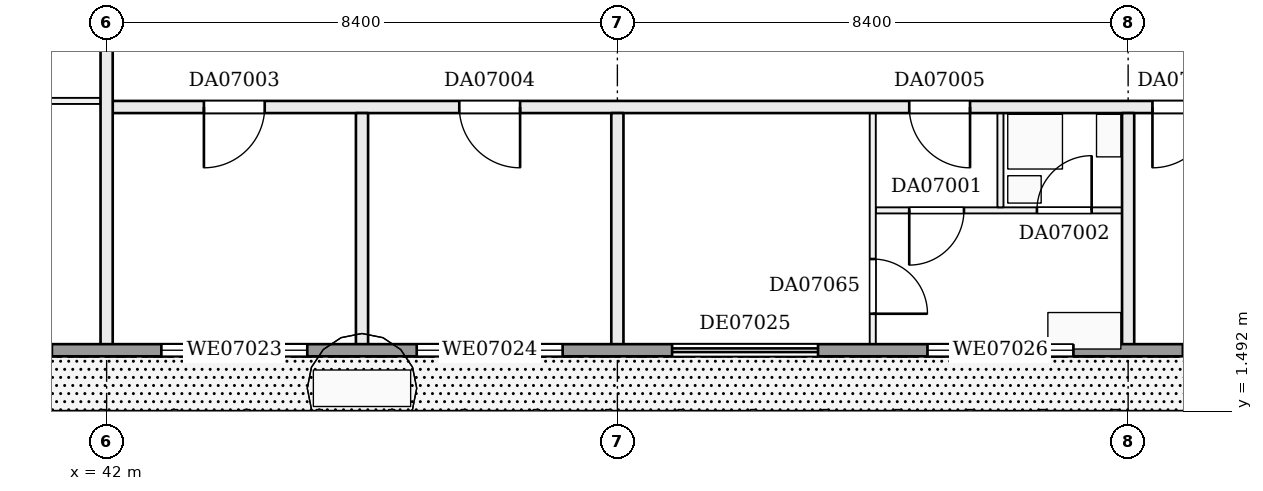
"""IFC4 building model, lengths in metres.
Left out: names, types, materials, properties, quantities, classifications, styles, units other than length and angle.
Written with IfcOpenShell. Run it as: python <this file> out.ifc"""

import sys

from ifc_helpers import new_model, si_unit, direction, frame, frame_2d, origin, place, context, subcontext, project, spatial, rectangle, extrude, element, fill, save


model = new_model("IFC4")
c1 = context("Model", 3, precision=1e-05, world=origin(), true_north=direction((0.0, 1.0)))
c2 = subcontext(c1, "Body", "Model", "MODEL_VIEW")
j1 = project(units=[si_unit("LENGTHUNIT", "METRE"), si_unit("PLANEANGLEUNIT", "RADIAN")], contexts=[c1])
p1 = place(None, origin())
s1 = spatial("IfcSite", under=j1, at=p1, CompositionType="ELEMENT")
p2 = place(p1, origin())
s2 = spatial("IfcBuilding", under=s1, at=p2, CompositionType="ELEMENT")
p3 = place(p2, frame((0.0, 0.0, 35.7)))
s3 = spatial("IfcBuildingStorey", under=s2, at=p3, CompositionType="ELEMENT", Elevation=35.7)
p4 = place(p3, frame((54.65, 4.8, 0.0), z_axis=(0.0, 0.0, 1.0), x_axis=(1.0, 0.0, 0.0)))
e1 = element("IfcWall", 1, at=p4, inside=s3, PredefinedType="PARTITIONING", context=c2, shape_type="SweptSolid", body=[
    extrude(rectangle(XDim=4.05, YDim=0.1, at=frame_2d((2.025, 0.0))), origin(), (0.0, 0.0, 1.0), 3.22),
])
p5 = place(p4, frame((0.55, 0.0, 0.0)))
e2 = element("IfcOpeningElement", 2, at=p5, cuts=e1, PredefinedType="OPENING", context=c2, shape_type="SweptSolid", body=[
    extrude(rectangle(XDim=0.9, YDim=2.1, at=frame_2d((0.45, 1.05))), frame((0.0, 0.06, 0.0), z_axis=(0.0, -1.0, 0.0), x_axis=(1.0, 0.0, 0.0)), (0.0, 0.0, 1.0), 0.12),
])
p6 = place(p4, frame((2.65, 0.0, 0.0)))
e3 = element("IfcOpeningElement", 3, at=p6, cuts=e1, PredefinedType="OPENING", context=c2, shape_type="SweptSolid", body=[
    extrude(rectangle(XDim=0.9, YDim=2.1, at=frame_2d((0.45, 1.05))), frame((0.0, 0.06, 0.0), z_axis=(0.0, -1.0, 0.0), x_axis=(1.0, 0.0, 0.0)), (0.0, 0.0, 1.0), 0.12),
])
p7 = place(p3, frame((42.1, 6.5, 0.0), z_axis=(0.0, 0.0, 1.0), x_axis=(1.0, 0.0, 0.0)))
e4 = element("IfcWall", 4, at=p7, inside=s3, PredefinedType="PARTITIONING", context=c2, shape_type="SweptSolid", body=[
    extrude(rectangle(XDim=18.7, YDim=0.2, at=frame_2d((9.35, 0.0))), origin(), (0.0, 0.0, 1.0), 3.22),
])
p8 = place(p7, frame((1.5, 0.0, 0.0)))
e5 = element("IfcOpeningElement", 5, at=p8, cuts=e4, PredefinedType="OPENING", context=c2, shape_type="SweptSolid", body=[
    extrude(rectangle(XDim=1.0, YDim=2.1, at=frame_2d((0.5, 1.05))), frame((0.0, 0.11, 0.0), z_axis=(0.0, -1.0, 0.0), x_axis=(1.0, 0.0, 0.0)), (0.0, 0.0, 1.0), 0.22),
])
p9 = place(p7, frame((5.7, 0.0, 0.0)))
e6 = element("IfcOpeningElement", 6, at=p9, cuts=e4, PredefinedType="OPENING", context=c2, shape_type="SweptSolid", body=[
    extrude(rectangle(XDim=1.0, YDim=2.1, at=frame_2d((0.5, 1.05))), frame((0.0, 0.11, 0.0), z_axis=(0.0, -1.0, 0.0), x_axis=(1.0, 0.0, 0.0)), (0.0, 0.0, 1.0), 0.22),
])
p10 = place(p7, frame((13.1, 0.0, 0.0)))
e7 = element("IfcOpeningElement", 7, at=p10, cuts=e4, PredefinedType="OPENING", context=c2, shape_type="SweptSolid", body=[
    extrude(rectangle(XDim=1.0, YDim=2.1, at=frame_2d((0.5, 1.05))), frame((0.0, 0.11, 0.0), z_axis=(0.0, -1.0, 0.0), x_axis=(1.0, 0.0, 0.0)), (0.0, 0.0, 1.0), 0.22),
])
p11 = place(p7, frame((17.1, 0.0, 0.0)))
e8 = element("IfcOpeningElement", 8, at=p11, cuts=e4, PredefinedType="OPENING", context=c2, shape_type="SweptSolid", body=[
    extrude(rectangle(XDim=1.0, YDim=2.1, at=frame_2d((0.5, 1.05))), frame((0.0, 0.11, 0.0), z_axis=(0.0, -1.0, 0.0), x_axis=(1.0, 0.0, 0.0)), (0.0, 0.0, 1.0), 0.22),
])
p12 = place(p3, frame((12.65, 6.6, 0.0), z_axis=(0.0, 0.0, 1.0), x_axis=(1.0, 0.0, 0.0)))
e9 = element("IfcWall", 9, at=p12, inside=s3, PredefinedType="PARTITIONING", context=c2, shape_type="SweptSolid", body=[
    extrude(rectangle(XDim=29.25, YDim=0.1, at=frame_2d((14.625, 0.0))), origin(), (0.0, 0.0, 1.0), 3.22),
])
p13 = place(p12, frame((1.65, 0.0, 0.0)))
e10 = element("IfcOpeningElement", 10, at=p13, cuts=e9, PredefinedType="OPENING", context=c2, shape_type="SweptSolid", body=[
    extrude(rectangle(XDim=0.9, YDim=2.1, at=frame_2d((0.45, 1.05))), frame((0.0, 0.06, 0.0), z_axis=(0.0, -1.0, 0.0), x_axis=(1.0, 0.0, 0.0)), (0.0, 0.0, 1.0), 0.12),
])
p14 = place(p12, frame((5.75, 0.0, 0.0)))
e11 = element("IfcOpeningElement", 11, at=p14, cuts=e9, PredefinedType="OPENING", context=c2, shape_type="SweptSolid", body=[
    extrude(rectangle(XDim=0.9, YDim=2.1, at=frame_2d((0.45, 1.05))), frame((0.0, 0.06, 0.0), z_axis=(0.0, -1.0, 0.0), x_axis=(1.0, 0.0, 0.0)), (0.0, 0.0, 1.0), 0.12),
])
p15 = place(p12, frame((11.15, 0.0, 0.0)))
e12 = element("IfcOpeningElement", 12, at=p15, cuts=e9, PredefinedType="OPENING", context=c2, shape_type="SweptSolid", body=[
    extrude(rectangle(XDim=0.9, YDim=2.1, at=frame_2d((0.45, 1.05))), frame((0.0, 0.06, 0.0), z_axis=(0.0, -1.0, 0.0), x_axis=(1.0, 0.0, 0.0)), (0.0, 0.0, 1.0), 0.12),
])
p16 = place(p12, frame((18.35, 0.0, 0.0)))
e13 = element("IfcOpeningElement", 13, at=p16, cuts=e9, PredefinedType="OPENING", context=c2, shape_type="SweptSolid", body=[
    extrude(rectangle(XDim=0.9, YDim=2.1, at=frame_2d((0.45, 1.05))), frame((0.0, 0.06, 0.0), z_axis=(0.0, -1.0, 0.0), x_axis=(1.0, 0.0, 0.0)), (0.0, 0.0, 1.0), 0.12),
])
p17 = place(p12, frame((22.55, 0.0, 0.0)))
e14 = element("IfcOpeningElement", 14, at=p17, cuts=e9, PredefinedType="OPENING", context=c2, shape_type="SweptSolid", body=[
    extrude(rectangle(XDim=0.9, YDim=2.1, at=frame_2d((0.45, 1.05))), frame((0.0, 0.06, 0.0), z_axis=(0.0, -1.0, 0.0), x_axis=(1.0, 0.0, 0.0)), (0.0, 0.0, 1.0), 0.12),
])
p18 = place(p12, frame((26.75, 0.0, 0.0)))
e15 = element("IfcOpeningElement", 15, at=p18, cuts=e9, PredefinedType="OPENING", context=c2, shape_type="SweptSolid", body=[
    extrude(rectangle(XDim=0.9, YDim=2.1, at=frame_2d((0.45, 1.05))), frame((0.0, 0.06, 0.0), z_axis=(0.0, -1.0, 0.0), x_axis=(1.0, 0.0, 0.0)), (0.0, 0.0, 1.0), 0.12),
])
p19 = place(p3, frame((42.0, 2.5, 0.0), z_axis=(0.0, 0.0, 1.0), x_axis=(0.0, 1.0, 0.0)))
e16 = element("IfcWall", 16, at=p19, inside=s3, PredefinedType="PARTITIONING", context=c2, shape_type="SweptSolid", body=[
    extrude(rectangle(XDim=5.9, YDim=0.2, at=frame_2d((2.95, 0.0))), origin(), (0.0, 0.0, 1.0), 3.22),
])
for number, where, z_axis, x_axis in (
    (17, (46.2, 2.5, 0.0), (0.0, 0.0, 1.0), (0.0, 1.0, 0.0)),
    (18, (50.4, 2.5, 0.0), (0.0, 0.0, 1.0), (0.0, 1.0, 0.0)),
):
    element("IfcWall", number, at=place(p3, frame(where, z_axis=z_axis, x_axis=x_axis)), inside=s3, PredefinedType="PARTITIONING", context=c2, shape_type="SweptSolid", body=[
        extrude(rectangle(XDim=3.9, YDim=0.2, at=frame_2d((1.95, 0.0))), origin(), (0.0, 0.0, 1.0), 3.22),
    ])
p20 = place(p3, frame((54.6, 2.5, 0.0), z_axis=(0.0, 0.0, 1.0), x_axis=(0.0, 1.0, 0.0)))
e19 = element("IfcWall", 19, at=p20, inside=s3, PredefinedType="PARTITIONING", context=c2, shape_type="SweptSolid", body=[
    extrude(rectangle(XDim=3.9, YDim=0.1, at=frame_2d((1.95, 0.0))), origin(), (0.0, 0.0, 1.0), 3.22),
])
p21 = place(p20, frame((0.6, 0.0, 0.0)))
e20 = element("IfcOpeningElement", 20, at=p21, cuts=e19, PredefinedType="OPENING", context=c2, shape_type="SweptSolid", body=[
    extrude(rectangle(XDim=0.9, YDim=2.1, at=frame_2d((0.45, 1.05))), frame((0.0, 0.06, 0.0), z_axis=(0.0, -1.0, 0.0), x_axis=(1.0, 0.0, 0.0)), (0.0, 0.0, 1.0), 0.12),
])
p22 = place(p3, frame((56.7, 4.85, 0.0), z_axis=(0.0, 0.0, 1.0), x_axis=(0.0, 1.0, 0.0)))
e21 = element("IfcWall", 21, at=p22, inside=s3, PredefinedType="PARTITIONING", context=c2, shape_type="SweptSolid", body=[
    extrude(rectangle(XDim=1.55, YDim=0.1, at=frame_2d((0.775, 0.0))), origin(), (0.0, 0.0, 1.0), 3.22),
])
p23 = place(p3, frame((58.8, 2.5, 0.0), z_axis=(0.0, 0.0, 1.0), x_axis=(0.0, 1.0, 0.0)))
e22 = element("IfcWall", 22, at=p23, inside=s3, PredefinedType="PARTITIONING", context=c2, shape_type="SweptSolid", body=[
    extrude(rectangle(XDim=3.9, YDim=0.2, at=frame_2d((1.95, 0.0))), origin(), (0.0, 0.0, 1.0), 3.22),
])
p24 = place(p3, frame((4.8, 2.5, 0.0), z_axis=(0.0, 0.0, 1.0), x_axis=(1.0, 0.0, 0.0)))
e23 = element("IfcWall", 23, at=p24, inside=s3, PredefinedType="SOLIDWALL", context=c2, shape_type="SweptSolid", body=[
    extrude(rectangle(XDim=57.6, YDim=0.2, at=frame_2d((28.8, 0.0))), origin(), (0.0, 0.0, 1.0), 3.22),
])
p25 = place(p24, frame((0.3, 0.0, 0.0)))
e24 = element("IfcOpeningElement", 24, at=p25, cuts=e23, PredefinedType="OPENING", context=c2, shape_type="SweptSolid", body=[
    extrude(rectangle(XDim=2.4, YDim=2.2, at=frame_2d((1.2, 1.1))), frame((0.0, 0.11, 0.0), z_axis=(0.0, -1.0, 0.0), x_axis=(1.0, 0.0, 0.0)), (0.0, 0.0, 1.0), 0.22),
])
p26 = place(p24, frame((4.5, 0.0, 0.9)))
e25 = element("IfcOpeningElement", 25, at=p26, cuts=e23, PredefinedType="OPENING", context=c2, shape_type="SweptSolid", body=[
    extrude(rectangle(XDim=2.4, YDim=1.5, at=frame_2d((1.2, 0.75))), frame((0.0, 0.11, 0.0), z_axis=(0.0, -1.0, 0.0), x_axis=(1.0, 0.0, 0.0)), (0.0, 0.0, 1.0), 0.22),
])
p27 = place(p24, frame((8.7, 0.0, 0.9)))
e26 = element("IfcOpeningElement", 26, at=p27, cuts=e23, PredefinedType="OPENING", context=c2, shape_type="SweptSolid", body=[
    extrude(rectangle(XDim=2.4, YDim=1.5, at=frame_2d((1.2, 0.75))), frame((0.0, 0.11, 0.0), z_axis=(0.0, -1.0, 0.0), x_axis=(1.0, 0.0, 0.0)), (0.0, 0.0, 1.0), 0.22),
])
p28 = place(p24, frame((12.9, 0.0, 0.9)))
e27 = element("IfcOpeningElement", 27, at=p28, cuts=e23, PredefinedType="OPENING", context=c2, shape_type="SweptSolid", body=[
    extrude(rectangle(XDim=2.4, YDim=1.5, at=frame_2d((1.2, 0.75))), frame((0.0, 0.11, 0.0), z_axis=(0.0, -1.0, 0.0), x_axis=(1.0, 0.0, 0.0)), (0.0, 0.0, 1.0), 0.22),
])
p29 = place(p24, frame((17.1, 0.0, 0.0)))
e28 = element("IfcOpeningElement", 28, at=p29, cuts=e23, PredefinedType="OPENING", context=c2, shape_type="SweptSolid", body=[
    extrude(rectangle(XDim=2.4, YDim=2.2, at=frame_2d((1.2, 1.1))), frame((0.0, 0.11, 0.0), z_axis=(0.0, -1.0, 0.0), x_axis=(1.0, 0.0, 0.0)), (0.0, 0.0, 1.0), 0.22),
])
p30 = place(p24, frame((21.3, 0.0, 0.0)))
e29 = element("IfcOpeningElement", 29, at=p30, cuts=e23, PredefinedType="OPENING", context=c2, shape_type="SweptSolid", body=[
    extrude(rectangle(XDim=2.4, YDim=2.2, at=frame_2d((1.2, 1.1))), frame((0.0, 0.11, 0.0), z_axis=(0.0, -1.0, 0.0), x_axis=(1.0, 0.0, 0.0)), (0.0, 0.0, 1.0), 0.22),
])
p31 = place(p24, frame((25.5, 0.0, 0.9)))
e30 = element("IfcOpeningElement", 30, at=p31, cuts=e23, PredefinedType="OPENING", context=c2, shape_type="SweptSolid", body=[
    extrude(rectangle(XDim=2.4, YDim=1.5, at=frame_2d((1.2, 0.75))), frame((0.0, 0.11, 0.0), z_axis=(0.0, -1.0, 0.0), x_axis=(1.0, 0.0, 0.0)), (0.0, 0.0, 1.0), 0.22),
])
p32 = place(p24, frame((29.7, 0.0, 0.0)))
e31 = element("IfcOpeningElement", 31, at=p32, cuts=e23, PredefinedType="OPENING", context=c2, shape_type="SweptSolid", body=[
    extrude(rectangle(XDim=2.4, YDim=2.2, at=frame_2d((1.2, 1.1))), frame((0.0, 0.11, 0.0), z_axis=(0.0, -1.0, 0.0), x_axis=(1.0, 0.0, 0.0)), (0.0, 0.0, 1.0), 0.22),
])
p33 = place(p24, frame((33.9, 0.0, 0.9)))
e32 = element("IfcOpeningElement", 32, at=p33, cuts=e23, PredefinedType="OPENING", context=c2, shape_type="SweptSolid", body=[
    extrude(rectangle(XDim=2.4, YDim=1.5, at=frame_2d((1.2, 0.75))), frame((0.0, 0.11, 0.0), z_axis=(0.0, -1.0, 0.0), x_axis=(1.0, 0.0, 0.0)), (0.0, 0.0, 1.0), 0.22),
])
p34 = place(p24, frame((38.1, 0.0, 0.9)))
e33 = element("IfcOpeningElement", 33, at=p34, cuts=e23, PredefinedType="OPENING", context=c2, shape_type="SweptSolid", body=[
    extrude(rectangle(XDim=2.4, YDim=1.5, at=frame_2d((1.2, 0.75))), frame((0.0, 0.11, 0.0), z_axis=(0.0, -1.0, 0.0), x_axis=(1.0, 0.0, 0.0)), (0.0, 0.0, 1.0), 0.22),
])
p35 = place(p24, frame((42.3, 0.0, 0.9)))
e34 = element("IfcOpeningElement", 34, at=p35, cuts=e23, PredefinedType="OPENING", context=c2, shape_type="SweptSolid", body=[
    extrude(rectangle(XDim=2.4, YDim=1.5, at=frame_2d((1.2, 0.75))), frame((0.0, 0.11, 0.0), z_axis=(0.0, -1.0, 0.0), x_axis=(1.0, 0.0, 0.0)), (0.0, 0.0, 1.0), 0.22),
])
p36 = place(p24, frame((46.5, 0.0, 0.0)))
e35 = element("IfcOpeningElement", 35, at=p36, cuts=e23, PredefinedType="OPENING", context=c2, shape_type="SweptSolid", body=[
    extrude(rectangle(XDim=2.4, YDim=2.2, at=frame_2d((1.2, 1.1))), frame((0.0, 0.11, 0.0), z_axis=(0.0, -1.0, 0.0), x_axis=(1.0, 0.0, 0.0)), (0.0, 0.0, 1.0), 0.22),
])
p37 = place(p24, frame((50.7, 0.0, 0.9)))
e36 = element("IfcOpeningElement", 36, at=p37, cuts=e23, PredefinedType="OPENING", context=c2, shape_type="SweptSolid", body=[
    extrude(rectangle(XDim=2.4, YDim=1.5, at=frame_2d((1.2, 0.75))), frame((0.0, 0.11, 0.0), z_axis=(0.0, -1.0, 0.0), x_axis=(1.0, 0.0, 0.0)), (0.0, 0.0, 1.0), 0.22),
])
p38 = place(p24, frame((54.9, 0.0, 0.9)))
e37 = element("IfcOpeningElement", 37, at=p38, cuts=e23, PredefinedType="OPENING", context=c2, shape_type="SweptSolid", body=[
    extrude(rectangle(XDim=2.4, YDim=1.5, at=frame_2d((1.2, 0.75))), frame((0.0, 0.11, 0.0), z_axis=(0.0, -1.0, 0.0), x_axis=(1.0, 0.0, 0.0)), (0.0, 0.0, 1.0), 0.22),
])
p39 = place(p5, frame((0.9, 0.0, 0.0), z_axis=(0.0, 0.0, 1.0), x_axis=(-1.0, 0.0, 0.0)))
e38 = element("IfcDoor", 38, at=p39, inside=s3, OperationType="SINGLE_SWING_RIGHT", PredefinedType="DOOR", context=c2, shape_type="SweptSolid", body=[
    extrude(rectangle(XDim=0.9, YDim=2.1, at=frame_2d((0.45, 1.05))), frame((0.0, 0.025, 0.0), z_axis=(0.0, -1.0, 0.0), x_axis=(1.0, 0.0, 0.0)), (0.0, 0.0, 1.0), 0.05),
])
fill(e2, e38)
p40 = place(p6, origin())
e39 = element("IfcDoor", 39, at=p40, inside=s3, OperationType="SINGLE_SWING_RIGHT", PredefinedType="DOOR", context=c2, shape_type="SweptSolid", body=[
    extrude(rectangle(XDim=0.9, YDim=2.1, at=frame_2d((0.45, 1.05))), frame((0.0, 0.025, 0.0), z_axis=(0.0, -1.0, 0.0), x_axis=(1.0, 0.0, 0.0)), (0.0, 0.0, 1.0), 0.05),
])
fill(e3, e39)
p41 = place(p8, frame((1.0, 0.0, 0.0), z_axis=(0.0, 0.0, 1.0), x_axis=(-1.0, 0.0, 0.0)))
e40 = element("IfcDoor", 40, at=p41, inside=s3, OperationType="SINGLE_SWING_RIGHT", PredefinedType="DOOR", context=c2, shape_type="SweptSolid", body=[
    extrude(rectangle(XDim=1.0, YDim=2.1, at=frame_2d((0.5, 1.05))), frame((0.0, 0.025, 0.0), z_axis=(0.0, -1.0, 0.0), x_axis=(1.0, 0.0, 0.0)), (0.0, 0.0, 1.0), 0.05),
])
fill(e5, e40)
p42 = place(p9, frame((1.0, 0.0, 0.0), z_axis=(0.0, 0.0, 1.0), x_axis=(-1.0, 0.0, 0.0)))
e41 = element("IfcDoor", 41, at=p42, inside=s3, OperationType="SINGLE_SWING_LEFT", PredefinedType="DOOR", context=c2, shape_type="SweptSolid", body=[
    extrude(rectangle(XDim=1.0, YDim=2.1, at=frame_2d((0.5, 1.05))), frame((0.0, 0.025, 0.0), z_axis=(0.0, -1.0, 0.0), x_axis=(1.0, 0.0, 0.0)), (0.0, 0.0, 1.0), 0.05),
])
fill(e6, e41)
p43 = place(p10, frame((1.0, 0.0, 0.0), z_axis=(0.0, 0.0, 1.0), x_axis=(-1.0, 0.0, 0.0)))
e42 = element("IfcDoor", 42, at=p43, inside=s3, OperationType="SINGLE_SWING_LEFT", PredefinedType="DOOR", context=c2, shape_type="SweptSolid", body=[
    extrude(rectangle(XDim=1.0, YDim=2.1, at=frame_2d((0.5, 1.05))), frame((0.0, 0.025, 0.0), z_axis=(0.0, -1.0, 0.0), x_axis=(1.0, 0.0, 0.0)), (0.0, 0.0, 1.0), 0.05),
])
fill(e7, e42)
p44 = place(p11, frame((1.0, 0.0, 0.0), z_axis=(0.0, 0.0, 1.0), x_axis=(-1.0, 0.0, 0.0)))
e43 = element("IfcDoor", 43, at=p44, inside=s3, OperationType="SINGLE_SWING_RIGHT", PredefinedType="DOOR", context=c2, shape_type="SweptSolid", body=[
    extrude(rectangle(XDim=1.0, YDim=2.1, at=frame_2d((0.5, 1.05))), frame((0.0, 0.025, 0.0), z_axis=(0.0, -1.0, 0.0), x_axis=(1.0, 0.0, 0.0)), (0.0, 0.0, 1.0), 0.05),
])
fill(e8, e43)
p45 = place(p21, frame((0.9, 0.0, 0.0), z_axis=(0.0, 0.0, 1.0), x_axis=(-1.0, 0.0, 0.0)))
e44 = element("IfcDoor", 44, at=p45, inside=s3, OperationType="SINGLE_SWING_RIGHT", PredefinedType="DOOR", context=c2, shape_type="SweptSolid", body=[
    extrude(rectangle(XDim=0.9, YDim=2.1, at=frame_2d((0.45, 1.05))), frame((0.0, 0.025, 0.0), z_axis=(0.0, -1.0, 0.0), x_axis=(1.0, 0.0, 0.0)), (0.0, 0.0, 1.0), 0.05),
])
fill(e20, e44)
p46 = place(p34, origin())
e45 = element("IfcWindow", 45, at=p46, inside=s3, PartitioningType="SINGLE_PANEL", PredefinedType="WINDOW", context=c2, shape_type="SweptSolid", body=[
    extrude(rectangle(XDim=2.4, YDim=1.5, at=frame_2d((1.2, 0.75))), frame((0.0, 0.03, 0.0), z_axis=(0.0, -1.0, 0.0), x_axis=(1.0, 0.0, 0.0)), (0.0, 0.0, 1.0), 0.06),
])
fill(e33, e45)
p47 = place(p35, origin())
e46 = element("IfcWindow", 46, at=p47, inside=s3, PartitioningType="SINGLE_PANEL", PredefinedType="WINDOW", context=c2, shape_type="SweptSolid", body=[
    extrude(rectangle(XDim=2.4, YDim=1.5, at=frame_2d((1.2, 0.75))), frame((0.0, 0.03, 0.0), z_axis=(0.0, -1.0, 0.0), x_axis=(1.0, 0.0, 0.0)), (0.0, 0.0, 1.0), 0.06),
])
fill(e34, e46)
p48 = place(p36, origin())
e47 = element("IfcDoor", 47, at=p48, inside=s3, OperationType="DOUBLE_DOOR_SLIDING", PredefinedType="DOOR", context=c2, shape_type="SweptSolid", body=[
    extrude(rectangle(XDim=2.4, YDim=2.2, at=frame_2d((1.2, 1.1))), frame((0.0, 0.025, 0.0), z_axis=(0.0, -1.0, 0.0), x_axis=(1.0, 0.0, 0.0)), (0.0, 0.0, 1.0), 0.05),
])
fill(e35, e47)
p49 = place(p37, origin())
e48 = element("IfcWindow", 48, at=p49, inside=s3, PartitioningType="SINGLE_PANEL", PredefinedType="WINDOW", context=c2, shape_type="SweptSolid", body=[
    extrude(rectangle(XDim=2.4, YDim=1.5, at=frame_2d((1.2, 0.75))), frame((0.0, 0.03, 0.0), z_axis=(0.0, -1.0, 0.0), x_axis=(1.0, 0.0, 0.0)), (0.0, 0.0, 1.0), 0.06),
])
fill(e36, e48)
save(model, sys.argv[1])
